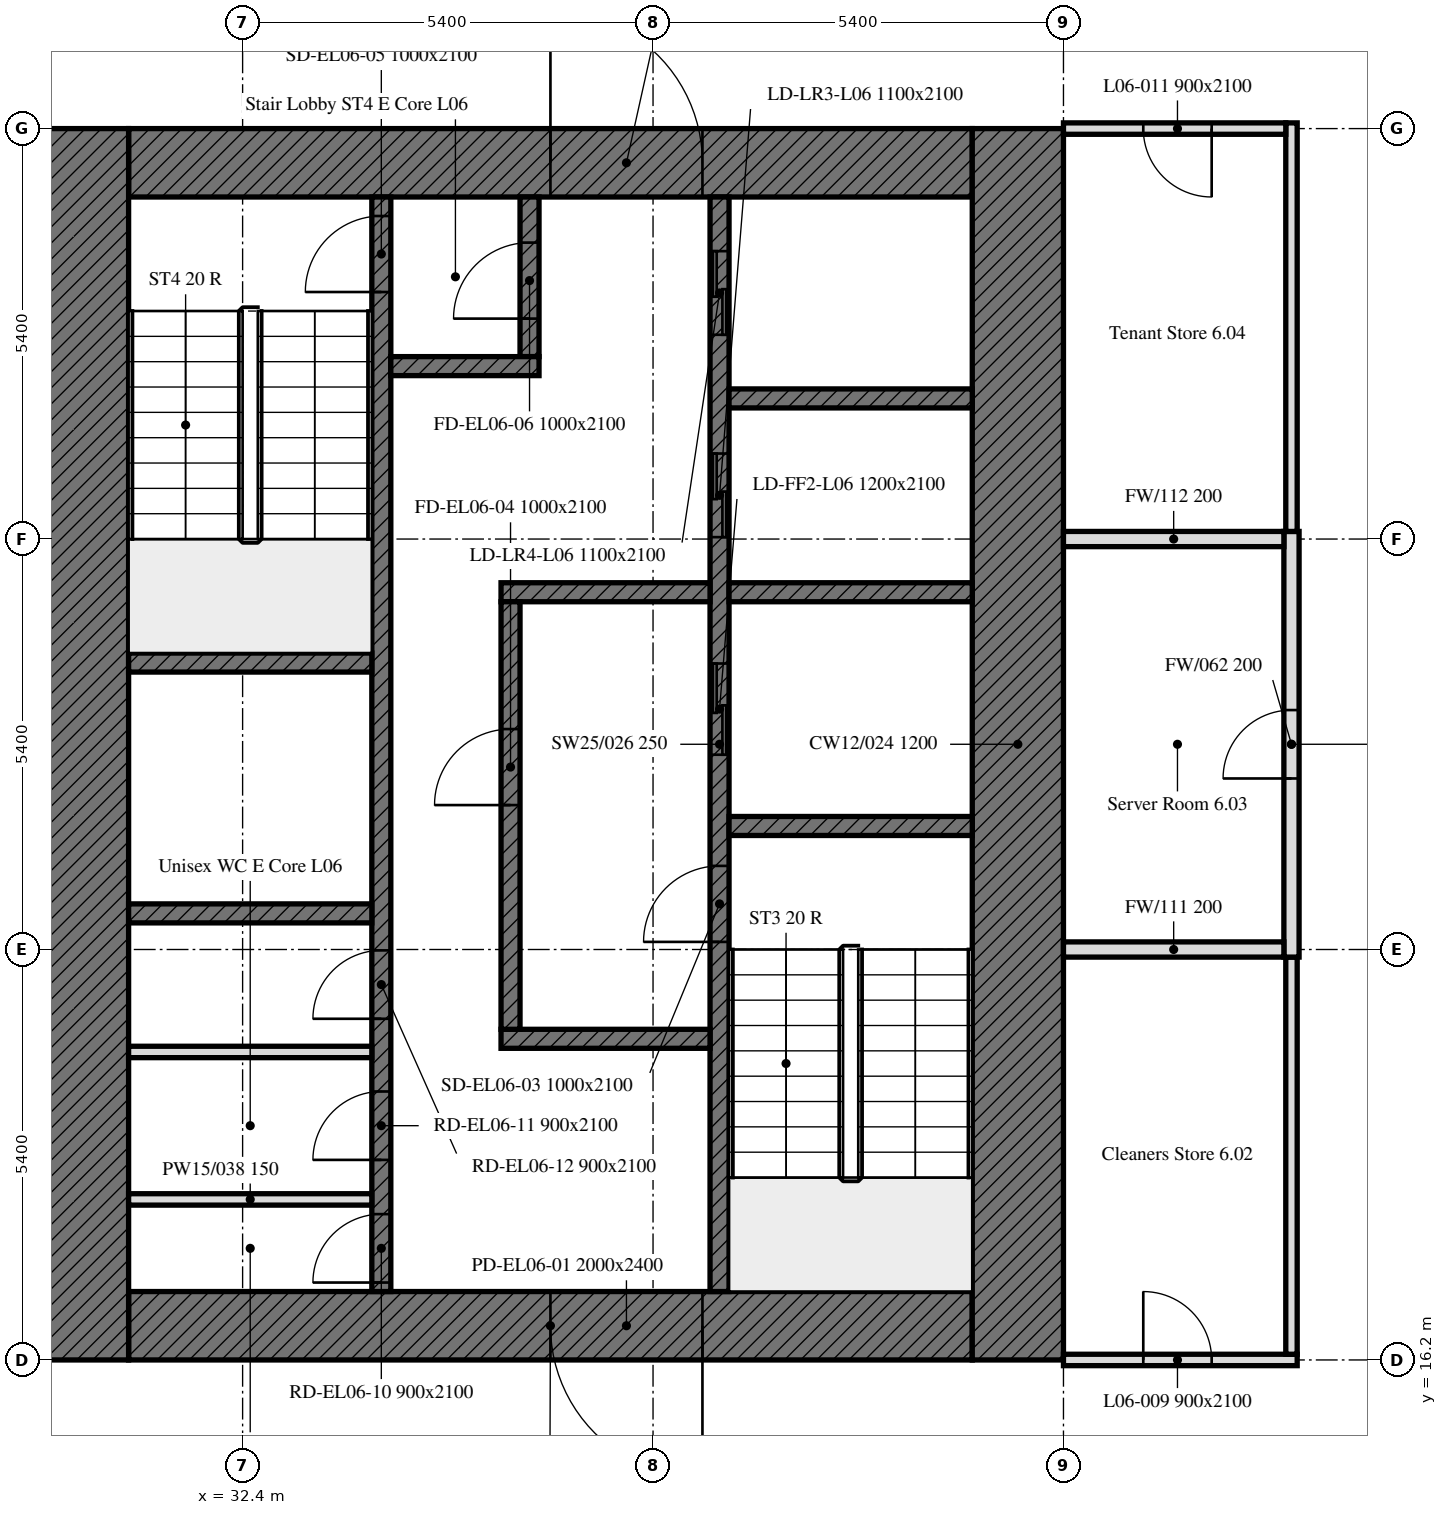
"""IFC4 building model, lengths in metres.
Left out: names, types, materials, properties, quantities, classifications, styles, units other than length and angle.
Written with IfcOpenShell. Run it as: python <this file> out.ifc"""

import sys

from ifc_helpers import new_model, si_unit, direction, frame, frame_2d, origin, place, context, subcontext, project, spatial, rectangle, extrude, element, fill, save


model = new_model("IFC4")
c1 = context("Model", 3, precision=1e-05, world=origin(), true_north=direction((0.0, 1.0)))
c2 = subcontext(c1, "Body", "Model", "MODEL_VIEW")
j1 = project(units=[si_unit("LENGTHUNIT", "METRE"), si_unit("PLANEANGLEUNIT", "RADIAN")], contexts=[c1])
p1 = place(None, origin())
s1 = spatial("IfcSite", under=j1, at=p1, CompositionType="ELEMENT")
p2 = place(p1, origin())
s2 = spatial("IfcBuilding", under=s1, at=p2, CompositionType="ELEMENT")
p3 = place(p2, frame((0.0, 0.0, 33.6)))
s3 = spatial("IfcBuildingStorey", under=s2, at=p3, CompositionType="ELEMENT", Elevation=33.6)
p4 = place(p3, frame((42.0, 16.65, 0.0), z_axis=(0.0, 0.0, 1.0), x_axis=(-1.0, 0.0, 0.0)))
e1 = element("IfcWall", 1, at=p4, inside=s3, PredefinedType="SOLIDWALL", context=c2, shape_type="SweptSolid", body=[
    extrude(rectangle(XDim=11.1, YDim=0.9, at=frame_2d((5.55, 0.0))), origin(), (0.0, 0.0, 1.0), 3.5),
])
p5 = place(p4, frame((3.55, 0.0, 0.0)))
e2 = element("IfcOpeningElement", 2, at=p5, cuts=e1, PredefinedType="OPENING", context=c2, shape_type="SweptSolid", body=[
    extrude(rectangle(XDim=2.0, YDim=2.4, at=frame_2d((1.0, 1.2))), frame((0.0, 0.45, 0.0), z_axis=(0.0, -1.0, 0.0), x_axis=(1.0, 0.0, 0.0)), (0.0, 0.0, 1.0), 0.9),
])
p6 = place(p3, frame((30.9, 31.95, 0.0), z_axis=(0.0, 0.0, 1.0), x_axis=(1.0, 0.0, 0.0)))
e3 = element("IfcWall", 3, at=p6, inside=s3, PredefinedType="SOLIDWALL", context=c2, shape_type="SweptSolid", body=[
    extrude(rectangle(XDim=11.1, YDim=0.9, at=frame_2d((5.55, 0.0))), origin(), (0.0, 0.0, 1.0), 3.5),
])
p7 = place(p6, frame((5.55, 0.0, 0.0)))
e4 = element("IfcOpeningElement", 4, at=p7, cuts=e3, PredefinedType="OPENING", context=c2, shape_type="SweptSolid", body=[
    extrude(rectangle(XDim=2.0, YDim=2.4, at=frame_2d((1.0, 1.2))), frame((0.0, 0.45, 0.0), z_axis=(0.0, -1.0, 0.0), x_axis=(1.0, 0.0, 0.0)), (0.0, 0.0, 1.0), 0.9),
])
for number, where, z_axis, x_axis in (
    (5, (42.6, 32.4, 0.0), (0.0, 0.0, 1.0), (0.0, -1.0, 0.0)),
    (6, (30.3, 16.2, 0.0), (0.0, 0.0, 1.0), (0.0, 1.0, 0.0)),
):
    element("IfcWall", number, at=place(p3, frame(where, z_axis=z_axis, x_axis=x_axis)), inside=s3, PredefinedType="SOLIDWALL", context=c2, shape_type="SweptSolid", body=[
        extrude(rectangle(XDim=16.2, YDim=1.2, at=frame_2d((8.1, 0.0))), origin(), (0.0, 0.0, 1.0), 3.5),
    ])
p8 = place(p3, frame((38.675, 17.1, 0.0), z_axis=(0.0, 0.0, 1.0), x_axis=(0.0, 1.0, 0.0)))
e7 = element("IfcWall", 7, at=p8, inside=s3, PredefinedType="SOLIDWALL", context=c2, shape_type="SweptSolid", body=[
    extrude(rectangle(XDim=14.4, YDim=0.25, at=frame_2d((7.2, 0.0))), origin(), (0.0, 0.0, 1.0), 3.5),
])
p9 = place(p8, frame((4.6, 0.0, 0.0)))
e8 = element("IfcOpeningElement", 8, at=p9, cuts=e7, PredefinedType="OPENING", context=c2, shape_type="SweptSolid", body=[
    extrude(rectangle(XDim=1.0, YDim=2.1, at=frame_2d((0.5, 1.05))), frame((0.0, 0.125, 0.0), z_axis=(0.0, -1.0, 0.0), x_axis=(1.0, 0.0, 0.0)), (0.0, 0.0, 1.0), 0.25),
])
p10 = place(p8, frame((7.062, 0.0, 0.0)))
e9 = element("IfcOpeningElement", 9, at=p10, cuts=e7, PredefinedType="OPENING", context=c2, shape_type="SweptSolid", body=[
    extrude(rectangle(XDim=1.2, YDim=2.1, at=frame_2d((0.6, 1.05))), frame((0.0, 0.125, 0.0), z_axis=(0.0, -1.0, 0.0), x_axis=(1.0, 0.0, 0.0)), (0.0, 0.0, 1.0), 0.25),
])
p11 = place(p8, frame((9.925, 0.0, 0.0)))
e10 = element("IfcOpeningElement", 10, at=p11, cuts=e7, PredefinedType="OPENING", context=c2, shape_type="SweptSolid", body=[
    extrude(rectangle(XDim=1.1, YDim=2.1, at=frame_2d((0.55, 1.05))), frame((0.0, 0.125, 0.0), z_axis=(0.0, -1.0, 0.0), x_axis=(1.0, 0.0, 0.0)), (0.0, 0.0, 1.0), 0.25),
])
p12 = place(p8, frame((12.587, 0.0, 0.0)))
e11 = element("IfcOpeningElement", 11, at=p12, cuts=e7, PredefinedType="OPENING", context=c2, shape_type="SweptSolid", body=[
    extrude(rectangle(XDim=1.1, YDim=2.1, at=frame_2d((0.55, 1.05))), frame((0.0, 0.125, 0.0), z_axis=(0.0, -1.0, 0.0), x_axis=(1.0, 0.0, 0.0)), (0.0, 0.0, 1.0), 0.25),
])
p13 = place(p3, frame((34.225, 17.1, 0.0), z_axis=(0.0, 0.0, 1.0), x_axis=(0.0, 1.0, 0.0)))
e12 = element("IfcWall", 12, at=p13, inside=s3, PredefinedType="SOLIDWALL", context=c2, shape_type="SweptSolid", body=[
    extrude(rectangle(XDim=14.4, YDim=0.25, at=frame_2d((7.2, 0.0))), origin(), (0.0, 0.0, 1.0), 3.5),
])
p14 = place(p13, frame((13.15, 0.0, 0.0)))
e13 = element("IfcOpeningElement", 13, at=p14, cuts=e12, PredefinedType="OPENING", context=c2, shape_type="SweptSolid", body=[
    extrude(rectangle(XDim=1.0, YDim=2.1, at=frame_2d((0.5, 1.05))), frame((0.0, 0.125, 0.0), z_axis=(0.0, -1.0, 0.0), x_axis=(1.0, 0.0, 0.0)), (0.0, 0.0, 1.0), 0.25),
])
p15 = place(p13, frame((0.118, 0.0, 0.0)))
e14 = element("IfcOpeningElement", 14, at=p15, cuts=e12, PredefinedType="OPENING", context=c2, shape_type="SweptSolid", body=[
    extrude(rectangle(XDim=0.9, YDim=2.1, at=frame_2d((0.45, 1.05))), frame((0.0, 0.125, 0.0), z_axis=(0.0, -1.0, 0.0), x_axis=(1.0, 0.0, 0.0)), (0.0, 0.0, 1.0), 0.25),
])
p16 = place(p13, frame((1.732, 0.0, 0.0)))
e15 = element("IfcOpeningElement", 15, at=p16, cuts=e12, PredefinedType="OPENING", context=c2, shape_type="SweptSolid", body=[
    extrude(rectangle(XDim=0.9, YDim=2.1, at=frame_2d((0.45, 1.05))), frame((0.0, 0.125, 0.0), z_axis=(0.0, -1.0, 0.0), x_axis=(1.0, 0.0, 0.0)), (0.0, 0.0, 1.0), 0.25),
])
p17 = place(p13, frame((3.588, 0.0, 0.0)))
e16 = element("IfcOpeningElement", 16, at=p17, cuts=e12, PredefinedType="OPENING", context=c2, shape_type="SweptSolid", body=[
    extrude(rectangle(XDim=0.9, YDim=2.1, at=frame_2d((0.45, 1.05))), frame((0.0, 0.125, 0.0), z_axis=(0.0, -1.0, 0.0), x_axis=(1.0, 0.0, 0.0)), (0.0, 0.0, 1.0), 0.25),
])
p18 = place(p3, frame((38.8, 23.225, 0.0), z_axis=(0.0, 0.0, 1.0), x_axis=(1.0, 0.0, 0.0)))
e17 = element("IfcWall", 17, at=p18, inside=s3, PredefinedType="SOLIDWALL", context=c2, shape_type="SweptSolid", body=[
    extrude(rectangle(XDim=3.2, YDim=0.25, at=frame_2d((1.6, 0.0))), origin(), (0.0, 0.0, 1.0), 3.5),
])
for number, where, z_axis, x_axis in (
    (18, (30.9, 25.375, 0.0), (0.0, 0.0, 1.0), (1.0, 0.0, 0.0)),
    (19, (30.9, 22.075, 0.0), (0.0, 0.0, 1.0), (1.0, 0.0, 0.0)),
):
    element("IfcWall", number, at=place(p3, frame(where, z_axis=z_axis, x_axis=x_axis)), inside=s3, PredefinedType="SOLIDWALL", context=c2, shape_type="SweptSolid", body=[
        extrude(rectangle(XDim=3.2, YDim=0.25, at=frame_2d((1.6, 0.0))), origin(), (0.0, 0.0, 1.0), 3.5),
    ])
p19 = place(p3, frame((38.8, 26.3, 0.0), z_axis=(0.0, 0.0, 1.0), x_axis=(1.0, 0.0, 0.0)))
e20 = element("IfcWall", 20, at=p19, inside=s3, PredefinedType="SOLIDWALL", context=c2, shape_type="SweptSolid", body=[
    extrude(rectangle(XDim=3.2, YDim=0.25, at=frame_2d((1.6, 0.0))), origin(), (0.0, 0.0, 1.0), 3.5),
])
for number, where, z_axis, x_axis in (
    (21, (35.8, 26.3, 0.0), (0.0, 0.0, 1.0), (1.0, 0.0, 0.0)),
    (22, (35.8, 20.425, 0.0), (0.0, 0.0, 1.0), (1.0, 0.0, 0.0)),
):
    element("IfcWall", number, at=place(p3, frame(where, z_axis=z_axis, x_axis=x_axis)), inside=s3, PredefinedType="SOLIDWALL", context=c2, shape_type="SweptSolid", body=[
        extrude(rectangle(XDim=2.75, YDim=0.25, at=frame_2d((1.375, 0.0))), origin(), (0.0, 0.0, 1.0), 3.5),
    ])
p20 = place(p3, frame((36.175, 29.4, 0.0), z_axis=(0.0, 0.0, 1.0), x_axis=(0.0, 1.0, 0.0)))
e23 = element("IfcWall", 23, at=p20, inside=s3, PredefinedType="SOLIDWALL", context=c2, shape_type="SweptSolid", body=[
    extrude(rectangle(XDim=2.1, YDim=0.25, at=frame_2d((1.05, 0.0))), origin(), (0.0, 0.0, 1.0), 3.5),
])
p21 = place(p20, frame((0.5, 0.0, 0.0)))
e24 = element("IfcOpeningElement", 24, at=p21, cuts=e23, PredefinedType="OPENING", context=c2, shape_type="SweptSolid", body=[
    extrude(rectangle(XDim=1.0, YDim=2.1, at=frame_2d((0.5, 1.05))), frame((0.0, 0.125, 0.0), z_axis=(0.0, -1.0, 0.0), x_axis=(1.0, 0.0, 0.0)), (0.0, 0.0, 1.0), 0.25),
])
p22 = place(p3, frame((34.35, 29.275, 0.0), z_axis=(0.0, 0.0, 1.0), x_axis=(1.0, 0.0, 0.0)))
e25 = element("IfcWall", 25, at=p22, inside=s3, PredefinedType="SOLIDWALL", context=c2, shape_type="SweptSolid", body=[
    extrude(rectangle(XDim=1.95, YDim=0.25, at=frame_2d((0.975, 0.0))), origin(), (0.0, 0.0, 1.0), 3.5),
])
p23 = place(p3, frame((35.925, 20.55, 0.0), z_axis=(0.0, 0.0, 1.0), x_axis=(0.0, 1.0, 0.0)))
e26 = element("IfcWall", 26, at=p23, inside=s3, PredefinedType="SOLIDWALL", context=c2, shape_type="SweptSolid", body=[
    extrude(rectangle(XDim=5.625, YDim=0.25, at=frame_2d((2.812, 0.0))), origin(), (0.0, 0.0, 1.0), 3.5),
])
p24 = place(p23, frame((2.95, 0.0, 0.0)))
e27 = element("IfcOpeningElement", 27, at=p24, cuts=e26, PredefinedType="OPENING", context=c2, shape_type="SweptSolid", body=[
    extrude(rectangle(XDim=1.0, YDim=2.1, at=frame_2d((0.5, 1.05))), frame((0.0, 0.125, 0.0), z_axis=(0.0, -1.0, 0.0), x_axis=(1.0, 0.0, 0.0)), (0.0, 0.0, 1.0), 0.25),
])
p25 = place(p3, frame((38.8, 28.85, 0.0), z_axis=(0.0, 0.0, 1.0), x_axis=(1.0, 0.0, 0.0)))
e28 = element("IfcWall", 28, at=p25, inside=s3, PredefinedType="SOLIDWALL", context=c2, shape_type="SweptSolid", body=[
    extrude(rectangle(XDim=3.2, YDim=0.25, at=frame_2d((1.6, 0.0))), origin(), (0.0, 0.0, 1.0), 3.5),
])
for number, where, z_axis, x_axis in (
    (29, (30.9, 18.312, 0.0), (0.0, 0.0, 1.0), (1.0, 0.0, 0.0)),
    (30, (30.9, 20.252, 0.0), (0.0, 0.0, 1.0), (1.0, 0.0, 0.0)),
):
    element("IfcWall", number, at=place(p3, frame(where, z_axis=z_axis, x_axis=x_axis)), inside=s3, PredefinedType="PARTITIONING", context=c2, shape_type="SweptSolid", body=[
        extrude(rectangle(XDim=3.2, YDim=0.15, at=frame_2d((1.6, 0.0))), origin(), (0.0, 0.0, 1.0), 3.5),
    ])
p26 = place(p3, frame((43.2, 16.2, 0.0), z_axis=(0.0, 0.0, 1.0), x_axis=(1.0, 0.0, 0.0)))
e31 = element("IfcWall", 31, at=p26, inside=s3, PredefinedType="PARTITIONING", context=c2, shape_type="SweptSolid", body=[
    extrude(rectangle(XDim=3.075, YDim=0.15, at=frame_2d((1.538, 0.0))), origin(), (0.0, 0.0, 1.0), 2.75),
])
p27 = place(p26, frame((1.05, 0.0, 0.0)))
e32 = element("IfcOpeningElement", 32, at=p27, cuts=e31, PredefinedType="OPENING", context=c2, shape_type="SweptSolid", body=[
    extrude(rectangle(XDim=0.9, YDim=2.1, at=frame_2d((0.45, 1.05))), frame((0.0, 0.075, 0.0), z_axis=(0.0, -1.0, 0.0), x_axis=(1.0, 0.0, 0.0)), (0.0, 0.0, 1.0), 0.15),
])
p28 = place(p3, frame((46.2, 16.275, 0.0), z_axis=(0.0, 0.0, 1.0), x_axis=(0.0, 1.0, 0.0)))
e33 = element("IfcWall", 33, at=p28, inside=s3, PredefinedType="PARTITIONING", context=c2, shape_type="SweptSolid", body=[
    extrude(rectangle(XDim=5.225, YDim=0.15, at=frame_2d((2.613, 0.0))), origin(), (0.0, 0.0, 1.0), 3.5),
])
p29 = place(p3, frame((46.2, 21.5, 0.0), z_axis=(0.0, 0.0, 1.0), x_axis=(0.0, 1.0, 0.0)))
e34 = element("IfcWall", 34, at=p29, inside=s3, PredefinedType="PARTITIONING", context=c2, shape_type="SweptSolid", body=[
    extrude(rectangle(XDim=5.6, YDim=0.2, at=frame_2d((2.8, 0.0))), origin(), (0.0, 0.0, 1.0), 3.5),
])
p30 = place(p29, frame((2.35, 0.0, 0.0)))
e35 = element("IfcOpeningElement", 35, at=p30, cuts=e34, PredefinedType="OPENING", context=c2, shape_type="SweptSolid", body=[
    extrude(rectangle(XDim=0.9, YDim=2.1, at=frame_2d((0.45, 1.05))), frame((0.0, 0.1, 0.0), z_axis=(0.0, -1.0, 0.0), x_axis=(1.0, 0.0, 0.0)), (0.0, 0.0, 1.0), 0.2),
])
p31 = place(p3, frame((46.2, 27.1, 0.0), z_axis=(0.0, 0.0, 1.0), x_axis=(0.0, 1.0, 0.0)))
e36 = element("IfcWall", 36, at=p31, inside=s3, PredefinedType="PARTITIONING", context=c2, shape_type="SweptSolid", body=[
    extrude(rectangle(XDim=5.375, YDim=0.15, at=frame_2d((2.688, 0.0))), origin(), (0.0, 0.0, 1.0), 3.5),
])
p32 = place(p3, frame((46.125, 32.4, 0.0), z_axis=(0.0, 0.0, 1.0), x_axis=(-1.0, 0.0, 0.0)))
e37 = element("IfcWall", 37, at=p32, inside=s3, PredefinedType="PARTITIONING", context=c2, shape_type="SweptSolid", body=[
    extrude(rectangle(XDim=2.925, YDim=0.15, at=frame_2d((1.462, 0.0))), origin(), (0.0, 0.0, 1.0), 2.75),
])
p33 = place(p32, frame((0.975, 0.0, 0.0)))
e38 = element("IfcOpeningElement", 38, at=p33, cuts=e37, PredefinedType="OPENING", context=c2, shape_type="SweptSolid", body=[
    extrude(rectangle(XDim=0.9, YDim=2.1, at=frame_2d((0.45, 1.05))), frame((0.0, 0.075, 0.0), z_axis=(0.0, -1.0, 0.0), x_axis=(1.0, 0.0, 0.0)), (0.0, 0.0, 1.0), 0.15),
])
for number, where, z_axis, x_axis in (
    (39, (46.1, 21.6, 0.0), (0.0, 0.0, 1.0), (-1.0, 0.0, 0.0)),
    (40, (46.1, 27.0, 0.0), (0.0, 0.0, 1.0), (-1.0, 0.0, 0.0)),
):
    element("IfcWall", number, at=place(p3, frame(where, z_axis=z_axis, x_axis=x_axis)), inside=s3, PredefinedType="PARTITIONING", context=c2, shape_type="SweptSolid", body=[
        extrude(rectangle(XDim=2.9, YDim=0.2, at=frame_2d((1.45, 0.0))), origin(), (0.0, 0.0, 1.0), 2.75),
    ])
p34 = place(p5, origin())
e41 = element("IfcDoor", 41, at=p34, inside=s3, OperationType="DOUBLE_DOOR_SINGLE_SWING", PredefinedType="DOOR", context=c2, shape_type="SweptSolid", body=[
    extrude(rectangle(XDim=2.0, YDim=2.4, at=frame_2d((1.0, 1.2))), frame((0.0, 0.025, 0.0), z_axis=(0.0, -1.0, 0.0), x_axis=(1.0, 0.0, 0.0)), (0.0, 0.0, 1.0), 0.05),
])
fill(e2, e41)
p35 = place(p7, origin())
e42 = element("IfcDoor", 42, at=p35, inside=s3, OperationType="DOUBLE_DOOR_SINGLE_SWING", PredefinedType="DOOR", context=c2, shape_type="SweptSolid", body=[
    extrude(rectangle(XDim=2.0, YDim=2.4, at=frame_2d((1.0, 1.2))), frame((0.0, 0.025, 0.0), z_axis=(0.0, -1.0, 0.0), x_axis=(1.0, 0.0, 0.0)), (0.0, 0.0, 1.0), 0.05),
])
fill(e4, e42)
p36 = place(p9, origin())
e43 = element("IfcDoor", 43, at=p36, inside=s3, OperationType="SINGLE_SWING_LEFT", PredefinedType="DOOR", context=c2, shape_type="SweptSolid", body=[
    extrude(rectangle(XDim=1.0, YDim=2.1, at=frame_2d((0.5, 1.05))), frame((0.0, 0.025, 0.0), z_axis=(0.0, -1.0, 0.0), x_axis=(1.0, 0.0, 0.0)), (0.0, 0.0, 1.0), 0.05),
])
fill(e8, e43)
p37 = place(p24, origin())
e44 = element("IfcDoor", 44, at=p37, inside=s3, OperationType="SINGLE_SWING_LEFT", PredefinedType="DOOR", context=c2, shape_type="SweptSolid", body=[
    extrude(rectangle(XDim=1.0, YDim=2.1, at=frame_2d((0.5, 1.05))), frame((0.0, 0.025, 0.0), z_axis=(0.0, -1.0, 0.0), x_axis=(1.0, 0.0, 0.0)), (0.0, 0.0, 1.0), 0.05),
])
fill(e27, e44)
p38 = place(p14, origin())
e45 = element("IfcDoor", 45, at=p38, inside=s3, OperationType="SINGLE_SWING_LEFT", PredefinedType="DOOR", context=c2, shape_type="SweptSolid", body=[
    extrude(rectangle(XDim=1.0, YDim=2.1, at=frame_2d((0.5, 1.05))), frame((0.0, 0.025, 0.0), z_axis=(0.0, -1.0, 0.0), x_axis=(1.0, 0.0, 0.0)), (0.0, 0.0, 1.0), 0.05),
])
fill(e13, e45)
p39 = place(p21, origin())
e46 = element("IfcDoor", 46, at=p39, inside=s3, OperationType="SINGLE_SWING_LEFT", PredefinedType="DOOR", context=c2, shape_type="SweptSolid", body=[
    extrude(rectangle(XDim=1.0, YDim=2.1, at=frame_2d((0.5, 1.05))), frame((0.0, 0.025, 0.0), z_axis=(0.0, -1.0, 0.0), x_axis=(1.0, 0.0, 0.0)), (0.0, 0.0, 1.0), 0.05),
])
fill(e24, e46)
p40 = place(p10, origin())
e47 = element("IfcDoor", 47, at=p40, inside=s3, OperationType="DOUBLE_DOOR_SLIDING", PredefinedType="DOOR", context=c2, shape_type="SweptSolid", body=[
    extrude(rectangle(XDim=1.2, YDim=2.1, at=frame_2d((0.6, 1.05))), frame((0.0, 0.025, 0.0), z_axis=(0.0, -1.0, 0.0), x_axis=(1.0, 0.0, 0.0)), (0.0, 0.0, 1.0), 0.05),
])
fill(e9, e47)
p41 = place(p11, origin())
e48 = element("IfcDoor", 48, at=p41, inside=s3, OperationType="DOUBLE_DOOR_SLIDING", PredefinedType="DOOR", context=c2, shape_type="SweptSolid", body=[
    extrude(rectangle(XDim=1.1, YDim=2.1, at=frame_2d((0.55, 1.05))), frame((0.0, 0.025, 0.0), z_axis=(0.0, -1.0, 0.0), x_axis=(1.0, 0.0, 0.0)), (0.0, 0.0, 1.0), 0.05),
])
fill(e10, e48)
p42 = place(p12, origin())
e49 = element("IfcDoor", 49, at=p42, inside=s3, OperationType="DOUBLE_DOOR_SLIDING", PredefinedType="DOOR", context=c2, shape_type="SweptSolid", body=[
    extrude(rectangle(XDim=1.1, YDim=2.1, at=frame_2d((0.55, 1.05))), frame((0.0, 0.025, 0.0), z_axis=(0.0, -1.0, 0.0), x_axis=(1.0, 0.0, 0.0)), (0.0, 0.0, 1.0), 0.05),
])
fill(e11, e49)
p43 = place(p15, origin())
e50 = element("IfcDoor", 50, at=p43, inside=s3, OperationType="SINGLE_SWING_LEFT", PredefinedType="DOOR", context=c2, shape_type="SweptSolid", body=[
    extrude(rectangle(XDim=0.9, YDim=2.1, at=frame_2d((0.45, 1.05))), frame((0.0, 0.025, 0.0), z_axis=(0.0, -1.0, 0.0), x_axis=(1.0, 0.0, 0.0)), (0.0, 0.0, 1.0), 0.05),
])
fill(e14, e50)
p44 = place(p16, origin())
e51 = element("IfcDoor", 51, at=p44, inside=s3, OperationType="SINGLE_SWING_LEFT", PredefinedType="DOOR", context=c2, shape_type="SweptSolid", body=[
    extrude(rectangle(XDim=0.9, YDim=2.1, at=frame_2d((0.45, 1.05))), frame((0.0, 0.025, 0.0), z_axis=(0.0, -1.0, 0.0), x_axis=(1.0, 0.0, 0.0)), (0.0, 0.0, 1.0), 0.05),
])
fill(e15, e51)
p45 = place(p17, origin())
e52 = element("IfcDoor", 52, at=p45, inside=s3, OperationType="SINGLE_SWING_LEFT", PredefinedType="DOOR", context=c2, shape_type="SweptSolid", body=[
    extrude(rectangle(XDim=0.9, YDim=2.1, at=frame_2d((0.45, 1.05))), frame((0.0, 0.025, 0.0), z_axis=(0.0, -1.0, 0.0), x_axis=(1.0, 0.0, 0.0)), (0.0, 0.0, 1.0), 0.05),
])
fill(e16, e52)
p46 = place(p27, origin())
e53 = element("IfcDoor", 53, at=p46, inside=s3, OperationType="SINGLE_SWING_RIGHT", PredefinedType="DOOR", context=c2, shape_type="SweptSolid", body=[
    extrude(rectangle(XDim=0.9, YDim=2.1, at=frame_2d((0.45, 1.05))), frame((0.0, 0.025, 0.0), z_axis=(0.0, -1.0, 0.0), x_axis=(1.0, 0.0, 0.0)), (0.0, 0.0, 1.0), 0.05),
])
fill(e32, e53)
p47 = place(p30, origin())
e54 = element("IfcDoor", 54, at=p47, inside=s3, OperationType="SINGLE_SWING_RIGHT", PredefinedType="DOOR", context=c2, shape_type="SweptSolid", body=[
    extrude(rectangle(XDim=0.9, YDim=2.1, at=frame_2d((0.45, 1.05))), frame((0.0, 0.025, 0.0), z_axis=(0.0, -1.0, 0.0), x_axis=(1.0, 0.0, 0.0)), (0.0, 0.0, 1.0), 0.05),
])
fill(e35, e54)
p48 = place(p33, origin())
e55 = element("IfcDoor", 55, at=p48, inside=s3, OperationType="SINGLE_SWING_RIGHT", PredefinedType="DOOR", context=c2, shape_type="SweptSolid", body=[
    extrude(rectangle(XDim=0.9, YDim=2.1, at=frame_2d((0.45, 1.05))), frame((0.0, 0.025, 0.0), z_axis=(0.0, -1.0, 0.0), x_axis=(1.0, 0.0, 0.0)), (0.0, 0.0, 1.0), 0.05),
])
fill(e38, e55)
save(model, sys.argv[1])
